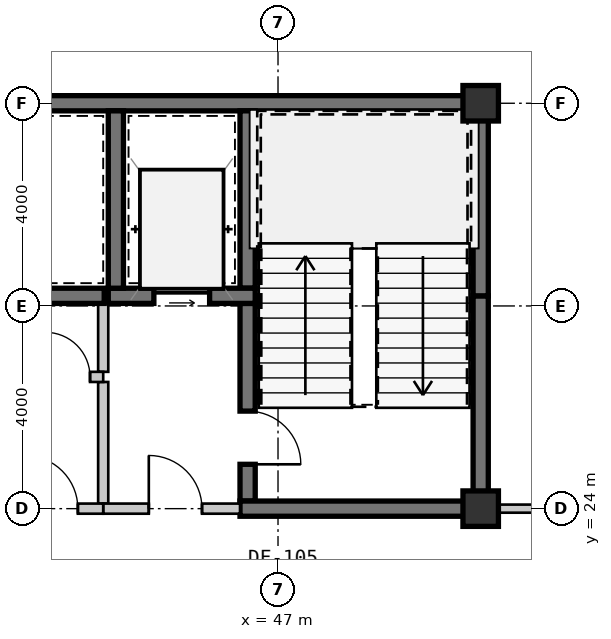
"""IFC4 building model, lengths in metres.
Left out: names, types, materials, properties, quantities, classifications, styles, units other than length and angle.
Written with IfcOpenShell. Run it as: python <this file> out.ifc"""

import sys

from ifc_helpers import new_model, si_unit, direction, frame, frame_2d, origin, origin_2d, place, context, subcontext, project, spatial, rectangle, extrude, source, transform, mapped, element, fill, save


model = new_model("IFC4")
c1 = context("Model", 3, precision=1e-05, world=origin(), true_north=direction((0.0, 1.0)))
c2 = subcontext(c1, "Body", "Model", "MODEL_VIEW")
j1 = project(units=[si_unit("LENGTHUNIT", "METRE"), si_unit("PLANEANGLEUNIT", "RADIAN")], contexts=[c1])
p1 = place(None, origin())
s1 = spatial("IfcSite", under=j1, at=p1, CompositionType="ELEMENT")
p2 = place(p1, origin())
s2 = spatial("IfcBuilding", under=s1, at=p2, CompositionType="ELEMENT")
p3 = place(p2, frame((0.0, 0.0, 99.75)))
s3 = spatial("IfcBuildingStorey", under=s2, at=p3, CompositionType="ELEMENT", Elevation=99.75)
m1 = source(origin(), c2, "Body", "SweptSolid", [
    extrude(rectangle(XDim=0.7, YDim=0.7, at=origin_2d()), origin(), (0.0, 0.0, 1.0), 3.15),
])
for number, where, z_axis, x_axis in (
    (1, (51.0, 24.0, 0.0), (0.0, 0.0, 1.0), (1.0, 0.0, 0.0)),
    (2, (51.0, 32.0, 0.0), (0.0, 0.0, 1.0), (1.0, 0.0, 0.0)),
):
    element("IfcColumn", number, at=place(p3, frame(where, z_axis=z_axis, x_axis=x_axis)), inside=s3, PredefinedType="COLUMN", context=c2, shape_type="MappedRepresentation", body=[
        mapped(m1, transform((0.0, 0.0, 0.0), scale=1.0)),
    ])
m2 = source(origin(), c2, "Body", "SweptSolid", [
    extrude(rectangle(XDim=11.95, YDim=0.3, at=frame_2d((5.975, 0.0))), origin(), (0.0, 0.0, 1.0), 2.93),
])
p4 = place(p3, frame((39.2, 32.0, 0.0), z_axis=(0.0, 0.0, 1.0), x_axis=(1.0, 0.0, 0.0)))
e3 = element("IfcWall", 3, at=p4, inside=s3, PredefinedType="SHEAR", context=c2, shape_type="MappedRepresentation", body=[
    mapped(m2, transform((0.0, 0.0, 0.0), scale=1.0)),
])
m3 = source(origin(), c2, "Body", "SweptSolid", [
    extrude(rectangle(XDim=4.05, YDim=0.3, at=frame_2d((2.025, 0.0))), origin(), (0.0, 0.0, 1.0), 2.93),
])
p5 = place(p3, frame((51.0, 24.15, 0.0), z_axis=(0.0, 0.0, 1.0), x_axis=(0.0, 1.0, 0.0)))
e4 = element("IfcWall", 4, at=p5, inside=s3, PredefinedType="SHEAR", context=c2, shape_type="MappedRepresentation", body=[
    mapped(m3, transform((0.0, 0.0, 0.0), scale=1.0)),
])
m4 = source(origin(), c2, "Body", "SweptSolid", [
    extrude(rectangle(XDim=3.65, YDim=0.3, at=frame_2d((1.825, 0.0))), origin(), (0.0, 0.0, 1.0), 2.93),
])
p6 = place(p3, frame((51.0, 28.2, 0.0), z_axis=(0.0, 0.0, 1.0), x_axis=(0.0, 1.0, 0.0)))
e5 = element("IfcWall", 5, at=p6, inside=s3, PredefinedType="SHEAR", context=c2, shape_type="MappedRepresentation", body=[
    mapped(m4, transform((0.0, 0.0, 0.0), scale=1.0)),
])
m5 = source(origin(), c2, "Body", "SweptSolid", [
    extrude(rectangle(XDim=3.5, YDim=0.3, at=frame_2d((1.75, 0.0))), origin(), (0.0, 0.0, 1.0), 2.93),
])
p7 = place(p3, frame((46.4, 31.85, 0.0), z_axis=(0.0, 0.0, 1.0), x_axis=(0.0, -1.0, 0.0)))
e6 = element("IfcWall", 6, at=p7, inside=s3, PredefinedType="SHEAR", context=c2, shape_type="MappedRepresentation", body=[
    mapped(m5, transform((0.0, 0.0, 0.0), scale=1.0)),
])
m6 = source(origin(), c2, "Body", "SweptSolid", [
    extrude(rectangle(XDim=3.9, YDim=0.3, at=frame_2d((1.95, 0.0))), origin(), (0.0, 0.0, 1.0), 2.93),
])
p8 = place(p3, frame((46.4, 28.05, 0.0), z_axis=(0.0, 0.0, 1.0), x_axis=(0.0, -1.0, 0.0)))
e7 = element("IfcWall", 7, at=p8, inside=s3, PredefinedType="SHEAR", context=c2, shape_type="MappedRepresentation", body=[
    mapped(m6, transform((0.0, 0.0, 0.0), scale=1.0)),
])
m7 = source(origin(), c2, "Body", "SweptSolid", [
    extrude(rectangle(XDim=1.05, YDim=2.1, at=frame_2d((0.525, 1.05))), frame((0.0, 0.16, 0.0), z_axis=(0.0, -1.0, 0.0), x_axis=(1.0, 0.0, 0.0)), (0.0, 0.0, 1.0), 0.32),
])
p9 = place(p8, frame((2.125, 0.0, 0.0)))
e8 = element("IfcOpeningElement", 8, at=p9, cuts=e7, PredefinedType="OPENING", context=c2, shape_type="MappedRepresentation", body=[
    mapped(m7, transform((0.0, 0.0, 0.0), scale=1.0)),
])
m8 = source(origin(), c2, "Body", "SweptSolid", [
    extrude(rectangle(XDim=4.9, YDim=0.3, at=frame_2d((2.45, 0.0))), origin(), (0.0, 0.0, 1.0), 2.93),
])
p10 = place(p3, frame((46.25, 24.0, 0.0), z_axis=(0.0, 0.0, 1.0), x_axis=(1.0, 0.0, 0.0)))
e9 = element("IfcWall", 9, at=p10, inside=s3, PredefinedType="SHEAR", context=c2, shape_type="MappedRepresentation", body=[
    mapped(m8, transform((0.0, 0.0, 0.0), scale=1.0)),
])
m9 = source(origin(), c2, "Body", "SweptSolid", [
    extrude(rectangle(XDim=2.9, YDim=0.3, at=frame_2d((1.45, 0.0))), origin(), (0.0, 0.0, 1.0), 2.93),
])
p11 = place(p3, frame((43.65, 28.2, 0.0), z_axis=(0.0, 0.0, 1.0), x_axis=(1.0, 0.0, 0.0)))
e10 = element("IfcWall", 10, at=p11, inside=s3, PredefinedType="SHEAR", context=c2, shape_type="MappedRepresentation", body=[
    mapped(m9, transform((0.0, 0.0, 0.0), scale=1.0)),
])
m10 = source(origin(), c2, "Body", "SweptSolid", [
    extrude(rectangle(XDim=1.1, YDim=2.15, at=frame_2d((0.55, 1.075))), frame((0.0, 0.16, 0.0), z_axis=(0.0, -1.0, 0.0), x_axis=(1.0, 0.0, 0.0)), (0.0, 0.0, 1.0), 0.32),
])
p12 = place(p11, frame((0.9, 0.0, 0.0)))
e11 = element("IfcOpeningElement", 11, at=p12, cuts=e10, PredefinedType="OPENING", context=c2, shape_type="MappedRepresentation", body=[
    mapped(m10, transform((0.0, 0.0, 0.0), scale=1.0)),
])
p13 = place(p3, frame((43.8, 31.85, 0.0), z_axis=(0.0, 0.0, 1.0), x_axis=(0.0, -1.0, 0.0)))
e12 = element("IfcWall", 12, at=p13, inside=s3, PredefinedType="SHEAR", context=c2, shape_type="MappedRepresentation", body=[
    mapped(m5, transform((0.0, 0.0, 0.0), scale=1.0)),
])
m11 = source(origin(), c2, "Body", "SweptSolid", [
    extrude(rectangle(XDim=2.4, YDim=0.2, at=frame_2d((1.2, 0.0))), origin(), (0.0, 0.0, 1.0), 2.93),
])
p14 = place(p3, frame((43.55, 26.5, 0.0), z_axis=(0.0, 0.0, 1.0), x_axis=(0.0, -1.0, 0.0)))
e13 = element("IfcWall", 13, at=p14, inside=s3, PredefinedType="SOLIDWALL", context=c2, shape_type="MappedRepresentation", body=[
    mapped(m11, transform((0.0, 0.0, 0.0), scale=1.0)),
])
m12 = source(origin(), c2, "Body", "SweptSolid", [
    extrude(rectangle(XDim=1.35, YDim=0.2, at=frame_2d((0.675, 0.0))), origin(), (0.0, 0.0, 1.0), 2.93),
])
p15 = place(p3, frame((43.55, 28.05, 0.0), z_axis=(0.0, 0.0, 1.0), x_axis=(0.0, -1.0, 0.0)))
e14 = element("IfcWall", 14, at=p15, inside=s3, PredefinedType="SOLIDWALL", context=c2, shape_type="MappedRepresentation", body=[
    mapped(m12, transform((0.0, 0.0, 0.0), scale=1.0)),
])
m13 = source(origin(), c2, "Body", "SweptSolid", [
    extrude(rectangle(XDim=2.7, YDim=0.2, at=frame_2d((1.35, 0.0))), origin(), (0.0, 0.0, 1.0), 2.397),
])
p16 = place(p3, frame((43.55, 24.0, 0.0), z_axis=(0.0, 0.0, 1.0), x_axis=(1.0, 0.0, 0.0)))
e15 = element("IfcWall", 15, at=p16, inside=s3, PredefinedType="SOLIDWALL", context=c2, shape_type="MappedRepresentation", body=[
    mapped(m13, transform((0.0, 0.0, 0.0), scale=1.0)),
])
m14 = source(origin(), c2, "Body", "SweptSolid", [
    extrude(rectangle(XDim=1.05, YDim=2.1, at=frame_2d((0.525, 1.05))), frame((0.0, 0.11, 0.0), z_axis=(0.0, -1.0, 0.0), x_axis=(1.0, 0.0, 0.0)), (0.0, 0.0, 1.0), 0.22),
])
p17 = place(p16, frame((0.9, 0.0, 0.0)))
e16 = element("IfcOpeningElement", 16, at=p17, cuts=e15, PredefinedType="OPENING", context=c2, shape_type="MappedRepresentation", body=[
    mapped(m14, transform((0.0, 0.0, 0.0), scale=1.0)),
])
m15 = source(origin(), c2, "Body", "SweptSolid", [
    extrude(rectangle(XDim=1.44, YDim=0.3, at=frame_2d((0.72, 0.0))), origin(), (0.0, 0.0, 1.0), 2.93),
])
p18 = place(p3, frame((42.13, 28.2, 0.0), z_axis=(0.0, 0.0, 1.0), x_axis=(1.0, 0.0, 0.0)))
e17 = element("IfcWall", 17, at=p18, inside=s3, PredefinedType="SHEAR", context=c2, shape_type="MappedRepresentation", body=[
    mapped(m15, transform((0.0, 0.0, 0.0), scale=1.0)),
])
m16 = source(origin(), c2, "Body", "SweptSolid", [
    extrude(rectangle(XDim=1.25, YDim=0.2, at=frame_2d((0.625, 0.0))), origin(), (0.0, 0.0, 1.0), 2.93),
])
p19 = place(p3, frame((42.3, 26.6, 0.0), z_axis=(0.0, 0.0, 1.0), x_axis=(1.0, 0.0, 0.0)))
e18 = element("IfcWall", 18, at=p19, inside=s3, PredefinedType="SOLIDWALL", context=c2, shape_type="MappedRepresentation", body=[
    mapped(m16, transform((0.0, 0.0, 0.0), scale=1.0)),
])
m17 = source(origin(), c2, "Body", "SweptSolid", [
    extrude(rectangle(XDim=0.88, YDim=2.1, at=frame_2d((0.44, 1.05))), frame((0.0, 0.11, 0.0), z_axis=(0.0, -1.0, 0.0), x_axis=(1.0, 0.0, 0.0)), (0.0, 0.0, 1.0), 0.22),
])
p20 = place(p19, frame((0.11, 0.0, 0.0)))
e19 = element("IfcOpeningElement", 19, at=p20, cuts=e18, PredefinedType="OPENING", context=c2, shape_type="MappedRepresentation", body=[
    mapped(m17, transform((0.0, 0.0, 0.0), scale=1.0)),
])
m18 = source(origin(), c2, "Body", "SweptSolid", [
    extrude(rectangle(XDim=2.05, YDim=0.2, at=frame_2d((1.025, 0.0))), origin(), (0.0, 0.0, 1.0), 2.397),
])
p21 = place(p3, frame((43.55, 24.0, 0.0), z_axis=(0.0, 0.0, 1.0), x_axis=(-1.0, 0.0, 0.0)))
e20 = element("IfcWall", 20, at=p21, inside=s3, PredefinedType="SOLIDWALL", context=c2, shape_type="MappedRepresentation", body=[
    mapped(m18, transform((0.0, 0.0, 0.0), scale=1.0)),
])
p22 = place(p21, frame((0.5, 0.0, 0.0)))
e21 = element("IfcOpeningElement", 21, at=p22, cuts=e20, PredefinedType="OPENING", context=c2, shape_type="MappedRepresentation", body=[
    mapped(m14, transform((0.0, 0.0, 0.0), scale=1.0)),
])
m19 = source(origin(), c2, "Body", "SweptSolid", [
    extrude(rectangle(XDim=1.155, YDim=0.16, at=frame_2d((0.577, 0.0))), origin(), (0.0, 0.0, 1.0), 2.328),
])
p23 = place(p3, frame((51.15, 24.0, 0.0), z_axis=(0.0, 0.0, 1.0), x_axis=(1.0, 0.0, 0.0)))
e22 = element("IfcWall", 22, at=p23, inside=s3, PredefinedType="PARTITIONING", context=c2, shape_type="MappedRepresentation", body=[
    mapped(m19, transform((0.0, 0.0, 0.0), scale=1.0)),
])
m20 = source(origin(), c2, "Body", "SweptSolid", [
    extrude(rectangle(XDim=1.05, YDim=2.1, at=frame_2d((0.525, 1.05))), frame((0.0, 0.025, 0.0), z_axis=(0.0, -1.0, 0.0), x_axis=(1.0, 0.0, 0.0)), (0.0, 0.0, 1.0), 0.05),
])
p24 = place(p9, origin())
e23 = element("IfcDoor", 23, at=p24, inside=s3, OperationType="SINGLE_SWING_RIGHT", PredefinedType="DOOR", context=c2, shape_type="MappedRepresentation", body=[
    mapped(m20, transform((0.0, 0.0, 0.0), scale=1.0)),
])
fill(e8, e23)
m21 = source(origin(), c2, "Body", "SweptSolid", [
    extrude(rectangle(XDim=1.1, YDim=2.15, at=frame_2d((0.55, 1.075))), frame((0.0, 0.025, 0.0), z_axis=(0.0, -1.0, 0.0), x_axis=(1.0, 0.0, 0.0)), (0.0, 0.0, 1.0), 0.05),
])
p25 = place(p12, origin())
e24 = element("IfcDoor", 24, at=p25, inside=s3, OperationType="SLIDING_TO_LEFT", PredefinedType="DOOR", context=c2, shape_type="MappedRepresentation", body=[
    mapped(m21, transform((0.0, 0.0, 0.0), scale=1.0)),
])
fill(e11, e24)
p26 = place(p17, origin())
e25 = element("IfcDoor", 25, at=p26, inside=s3, OperationType="SINGLE_SWING_LEFT", PredefinedType="DOOR", context=c2, shape_type="MappedRepresentation", body=[
    mapped(m20, transform((0.0, 0.0, 0.0), scale=1.0)),
])
fill(e16, e25)
m22 = source(origin(), c2, "Body", "SweptSolid", [
    extrude(rectangle(XDim=0.88, YDim=2.1, at=frame_2d((0.44, 1.05))), frame((0.0, 0.025, 0.0), z_axis=(0.0, -1.0, 0.0), x_axis=(1.0, 0.0, 0.0)), (0.0, 0.0, 1.0), 0.05),
])
p27 = place(p20, origin())
e26 = element("IfcDoor", 26, at=p27, inside=s3, OperationType="SINGLE_SWING_LEFT", PredefinedType="DOOR", context=c2, shape_type="MappedRepresentation", body=[
    mapped(m22, transform((0.0, 0.0, 0.0), scale=1.0)),
])
fill(e19, e26)
p28 = place(p22, frame((1.05, 0.0, 0.0), z_axis=(0.0, 0.0, 1.0), x_axis=(-1.0, 0.0, 0.0)))
e27 = element("IfcDoor", 27, at=p28, inside=s3, OperationType="SINGLE_SWING_LEFT", PredefinedType="DOOR", context=c2, shape_type="MappedRepresentation", body=[
    mapped(m20, transform((0.0, 0.0, 0.0), scale=1.0)),
])
fill(e21, e27)
save(model, sys.argv[1])
